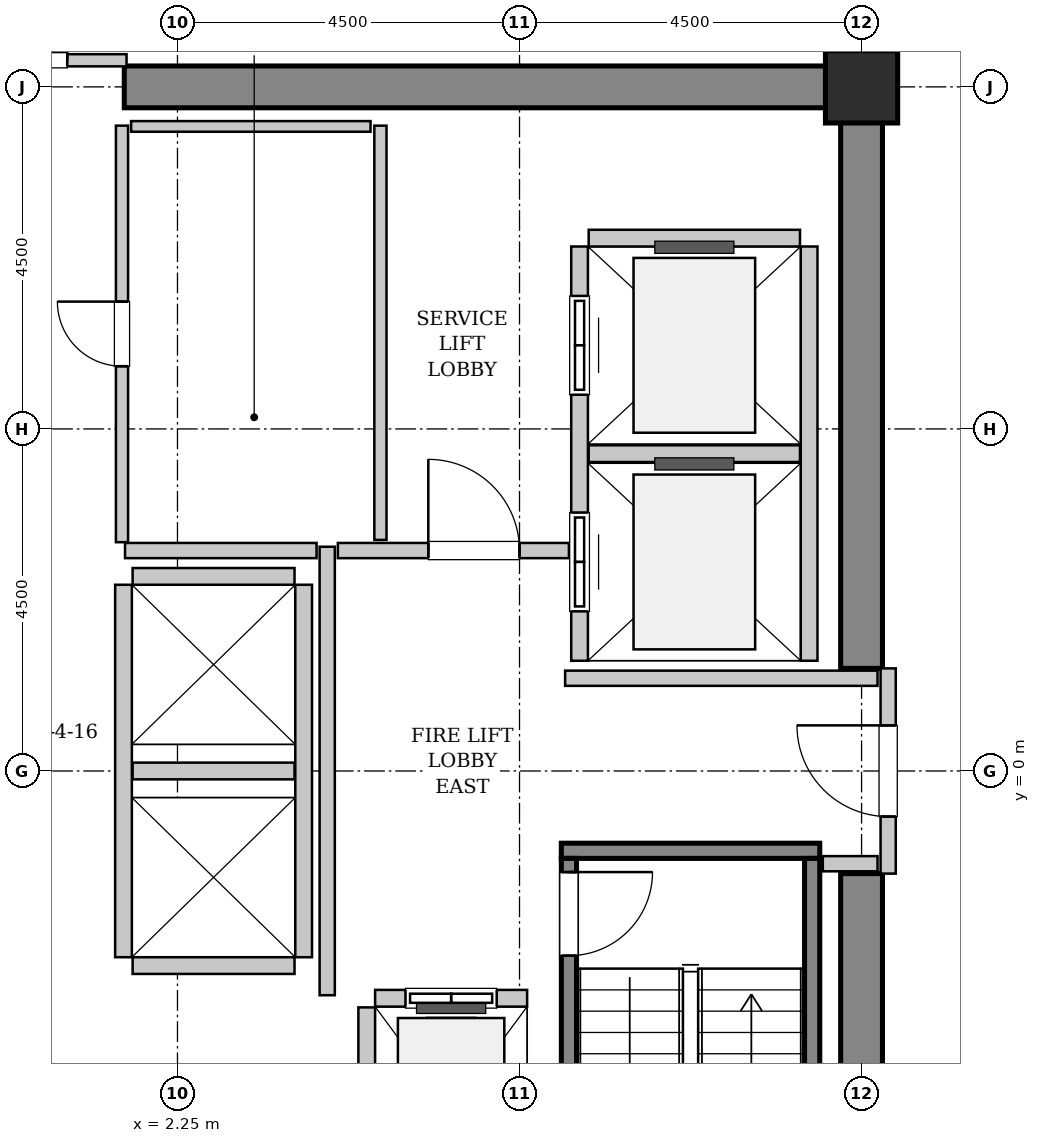
"""IFC4 building model, lengths in metres.
Left out: names, types, materials, properties, quantities, classifications, styles, units other than length and angle.
Written with IfcOpenShell. Run it as: python <this file> out.ifc"""

import sys

from ifc_helpers import new_model, si_unit, direction, frame, frame_2d, origin, origin_2d, place, context, subcontext, project, spatial, rectangle, hollow_rectangle, extrude, source, transform, mapped, element, fill, save


model = new_model("IFC4")
c1 = context("Model", 3, precision=1e-05, world=origin(), true_north=direction((0.0, 1.0)))
c2 = subcontext(c1, "Body", "Model", "MODEL_VIEW")
j1 = project(units=[si_unit("LENGTHUNIT", "METRE"), si_unit("PLANEANGLEUNIT", "RADIAN")], contexts=[c1])
p1 = place(None, origin())
s1 = spatial("IfcSite", under=j1, at=p1, CompositionType="ELEMENT")
p2 = place(p1, origin())
s2 = spatial("IfcBuilding", under=s1, at=p2, CompositionType="ELEMENT")
p3 = place(p2, frame((0.0, 0.0, 164.0)))
s3 = spatial("IfcBuildingStorey", under=s2, at=p3, CompositionType="ELEMENT", Elevation=164.0)
m1 = source(origin(), c2, "Body", "SweptSolid", [
    extrude(rectangle(XDim=9.975, YDim=0.55, at=frame_2d((4.987, 0.0))), origin(), (0.0, 0.0, 1.0), 3.8),
])
p4 = place(p3, frame((1.55, 9.0, 0.0), z_axis=(0.0, 0.0, 1.0), x_axis=(1.0, 0.0, 0.0)))
e1 = element("IfcWall", 1, at=p4, inside=s3, PredefinedType="SHEAR", context=c2, shape_type="MappedRepresentation", body=[
    mapped(m1, transform((0.0, 0.0, 0.0), x_axis=(1.0, 0.0, 0.0), y_axis=(0.0, 1.0, 0.0), z_axis=(0.0, 0.0, 1.0), scale=1.0)),
])
m2 = source(origin(), c2, "Body", "SweptSolid", [
    extrude(rectangle(XDim=7.375, YDim=0.55, at=frame_2d((3.688, 0.0))), origin(), (0.0, 0.0, 1.0), 3.8),
])
for number, where, z_axis, x_axis in (
    (2, (11.25, -8.725, 0.0), (0.0, 0.0, 1.0), (0.0, 1.0, 0.0)),
    (3, (11.25, 1.35, 0.0), (0.0, 0.0, 1.0), (0.0, 1.0, 0.0)),
):
    element("IfcWall", number, at=place(p3, frame(where, z_axis=z_axis, x_axis=x_axis)), inside=s3, PredefinedType="SHEAR", context=c2, shape_type="MappedRepresentation", body=[
        mapped(m2, transform((0.0, 0.0, 0.0), x_axis=(1.0, 0.0, 0.0), y_axis=(0.0, 1.0, 0.0), z_axis=(0.0, 0.0, 1.0), scale=1.0)),
    ])
m3 = source(origin(), c2, "Body", "SweptSolid", [
    extrude(hollow_rectangle(XDim=0.95, YDim=0.95, WallThickness=0.045, InnerFilletRadius=0.045, OuterFilletRadius=0.09, at=origin_2d()), origin(), (0.0, 0.0, 1.0), 3.8),
])
p5 = place(p3, frame((11.25, 9.0, 0.0), z_axis=(0.0, 0.0, 1.0), x_axis=(1.0, 0.0, 0.0)))
e4 = element("IfcColumn", 4, at=p5, inside=s3, PredefinedType="COLUMN", context=c2, shape_type="MappedRepresentation", body=[
    mapped(m3, transform((0.0, 0.0, 0.0), x_axis=(1.0, 0.0, 0.0), y_axis=(0.0, 1.0, 0.0), z_axis=(0.0, 0.0, 1.0), scale=1.0)),
])
m4 = source(origin(), c2, "Body", "SweptSolid", [
    extrude(rectangle(XDim=3.4, YDim=0.2, at=frame_2d((1.7, 0.0))), origin(), (0.0, 0.0, 1.0), 3.8),
])
p6 = place(p3, frame((7.3, -1.05, 0.0), z_axis=(0.0, 0.0, 1.0), x_axis=(1.0, 0.0, 0.0)))
e5 = element("IfcWall", 5, at=p6, inside=s3, PredefinedType="SOLIDWALL", context=c2, shape_type="MappedRepresentation", body=[
    mapped(m4, transform((0.0, 0.0, 0.0), x_axis=(1.0, 0.0, 0.0), y_axis=(0.0, 1.0, 0.0), z_axis=(0.0, 0.0, 1.0), scale=1.0)),
])
m5 = source(origin(), c2, "Body", "SweptSolid", [
    extrude(rectangle(XDim=7.1, YDim=0.2, at=frame_2d((3.55, 0.0))), origin(), (0.0, 0.0, 1.0), 3.8),
])
p7 = place(p3, frame((7.4, -1.15, 0.0), z_axis=(0.0, 0.0, 1.0), x_axis=(0.0, -1.0, 0.0)))
e6 = element("IfcWall", 6, at=p7, inside=s3, PredefinedType="SOLIDWALL", context=c2, shape_type="MappedRepresentation", body=[
    mapped(m5, transform((0.0, 0.0, 0.0), x_axis=(1.0, 0.0, 0.0), y_axis=(0.0, 1.0, 0.0), z_axis=(0.0, 0.0, 1.0), scale=1.0)),
])
p8 = place(p7, frame((0.18, 0.0, 0.0)))
e7 = element("IfcOpeningElement", 7, at=p8, cuts=e6, PredefinedType="OPENING", context=c2, shape_type="SweptSolid", body=[
    extrude(rectangle(XDim=1.1, YDim=2.15, at=frame_2d((0.55, 1.075))), frame((0.0, 0.11, 0.0), z_axis=(0.0, -1.0, 0.0), x_axis=(1.0, 0.0, 0.0)), (0.0, 0.0, 1.0), 0.22),
])
p9 = place(p3, frame((10.6, -1.15, 0.0), z_axis=(0.0, 0.0, 1.0), x_axis=(0.0, -1.0, 0.0)))
e8 = element("IfcWall", 8, at=p9, inside=s3, PredefinedType="SOLIDWALL", context=c2, shape_type="MappedRepresentation", body=[
    mapped(m5, transform((0.0, 0.0, 0.0), x_axis=(1.0, 0.0, 0.0), y_axis=(0.0, 1.0, 0.0), z_axis=(0.0, 0.0, 1.0), scale=1.0)),
])
m6 = source(origin(), c2, "Body", "SweptSolid", [
    extrude(rectangle(XDim=2.0, YDim=0.22, at=frame_2d((1.0, 0.0))), origin(), (0.0, 0.0, 1.0), 3.535),
])
p10 = place(p3, frame((6.85, -2.99, 0.0), z_axis=(0.0, 0.0, 1.0), x_axis=(-1.0, 0.0, 0.0)))
e9 = element("IfcWall", 9, at=p10, inside=s3, PredefinedType="SOLIDWALL", context=c2, shape_type="MappedRepresentation", body=[
    mapped(m6, transform((0.0, 0.0, 0.0), x_axis=(1.0, 0.0, 0.0), y_axis=(0.0, 1.0, 0.0), z_axis=(0.0, 0.0, 1.0), scale=1.0)),
])
p11 = place(p10, frame((0.4, 0.0, 0.0)))
e10 = element("IfcOpeningElement", 10, at=p11, cuts=e9, PredefinedType="OPENING", context=c2, shape_type="SweptSolid", body=[
    extrude(rectangle(XDim=1.2, YDim=2.2, at=frame_2d((0.6, 1.1))), frame((0.0, 0.12, 0.0), z_axis=(0.0, -1.0, 0.0), x_axis=(1.0, 0.0, 0.0)), (0.0, 0.0, 1.0), 0.24),
])
m7 = source(origin(), c2, "Body", "SweptSolid", [
    extrude(rectangle(XDim=2.68, YDim=0.22, at=frame_2d((1.34, 0.0))), origin(), (0.0, 0.0, 1.0), 3.535),
])
p12 = place(p3, frame((4.74, -3.11, 0.0), z_axis=(0.0, 0.0, 1.0), x_axis=(0.0, -1.0, 0.0)))
e11 = element("IfcWall", 11, at=p12, inside=s3, PredefinedType="SOLIDWALL", context=c2, shape_type="MappedRepresentation", body=[
    mapped(m7, transform((0.0, 0.0, 0.0), x_axis=(1.0, 0.0, 0.0), y_axis=(0.0, 1.0, 0.0), z_axis=(0.0, 0.0, 1.0), scale=1.0)),
])
m8 = source(origin(), c2, "Body", "SweptSolid", [
    extrude(rectangle(XDim=5.45, YDim=0.22, at=frame_2d((2.725, 0.0))), origin(), (0.0, 0.0, 1.0), 3.535),
])
p13 = place(p3, frame((7.54, 6.9, 0.0), z_axis=(0.0, 0.0, 1.0), x_axis=(0.0, -1.0, 0.0)))
e12 = element("IfcWall", 12, at=p13, inside=s3, PredefinedType="SOLIDWALL", context=c2, shape_type="MappedRepresentation", body=[
    mapped(m8, transform((0.0, 0.0, 0.0), x_axis=(1.0, 0.0, 0.0), y_axis=(0.0, 1.0, 0.0), z_axis=(0.0, 0.0, 1.0), scale=1.0)),
])
p14 = place(p13, frame((3.5, 0.0, 0.0)))
e13 = element("IfcOpeningElement", 13, at=p14, cuts=e12, PredefinedType="OPENING", context=c2, shape_type="SweptSolid", body=[
    extrude(rectangle(XDim=1.3, YDim=2.3, at=frame_2d((0.65, 1.15))), frame((0.0, 0.12, 0.0), z_axis=(0.0, -1.0, 0.0), x_axis=(1.0, 0.0, 0.0)), (0.0, 0.0, 1.0), 0.24),
])
p15 = place(p13, frame((0.65, 0.0, 0.0)))
e14 = element("IfcOpeningElement", 14, at=p15, cuts=e12, PredefinedType="OPENING", context=c2, shape_type="SweptSolid", body=[
    extrude(rectangle(XDim=1.3, YDim=2.3, at=frame_2d((0.65, 1.15))), frame((0.0, 0.12, 0.0), z_axis=(0.0, -1.0, 0.0), x_axis=(1.0, 0.0, 0.0)), (0.0, 0.0, 1.0), 0.24),
])
p16 = place(p3, frame((10.56, 1.45, 0.0), z_axis=(0.0, 0.0, 1.0), x_axis=(0.0, 1.0, 0.0)))
e15 = element("IfcWall", 15, at=p16, inside=s3, PredefinedType="SOLIDWALL", context=c2, shape_type="MappedRepresentation", body=[
    mapped(m8, transform((0.0, 0.0, 0.0), x_axis=(1.0, 0.0, 0.0), y_axis=(0.0, 1.0, 0.0), z_axis=(0.0, 0.0, 1.0), scale=1.0)),
])
m9 = source(origin(), c2, "Body", "SweptSolid", [
    extrude(rectangle(XDim=2.78, YDim=0.22, at=frame_2d((1.39, 0.0))), origin(), (0.0, 0.0, 1.0), 3.535),
])
for number, where, z_axis, x_axis in (
    (16, (7.66, 4.175, 0.0), (0.0, 0.0, 1.0), (1.0, 0.0, 0.0)),
    (17, (10.44, 7.01, 0.0), (0.0, 0.0, 1.0), (-1.0, 0.0, 0.0)),
):
    element("IfcWall", number, at=place(p3, frame(where, z_axis=z_axis, x_axis=x_axis)), inside=s3, PredefinedType="SOLIDWALL", context=c2, shape_type="MappedRepresentation", body=[
        mapped(m9, transform((0.0, 0.0, 0.0), x_axis=(1.0, 0.0, 0.0), y_axis=(0.0, 1.0, 0.0), z_axis=(0.0, 0.0, 1.0), scale=1.0)),
    ])
m10 = source(origin(), c2, "Body", "SweptSolid", [
    extrude(rectangle(XDim=4.9, YDim=0.22, at=frame_2d((2.45, 0.0))), origin(), (0.0, 0.0, 1.0), 3.535),
])
for number, where, z_axis, x_axis in (
    (18, (1.54, 2.45, 0.0), (0.0, 0.0, 1.0), (0.0, -1.0, 0.0)),
    (19, (3.91, -2.45, 0.0), (0.0, 0.0, 1.0), (0.0, 1.0, 0.0)),
):
    element("IfcWall", number, at=place(p3, frame(where, z_axis=z_axis, x_axis=x_axis)), inside=s3, PredefinedType="SOLIDWALL", context=c2, shape_type="MappedRepresentation", body=[
        mapped(m10, transform((0.0, 0.0, 0.0), x_axis=(1.0, 0.0, 0.0), y_axis=(0.0, 1.0, 0.0), z_axis=(0.0, 0.0, 1.0), scale=1.0)),
    ])
m11 = source(origin(), c2, "Body", "SweptSolid", [
    extrude(rectangle(XDim=2.13, YDim=0.22, at=frame_2d((1.065, 0.0))), origin(), (0.0, 0.0, 1.0), 3.535),
])
for number, where, z_axis, x_axis in (
    (20, (1.66, -2.56, 0.0), (0.0, 0.0, 1.0), (1.0, 0.0, 0.0)),
    (21, (1.66, 0.0, 0.0), (0.0, 0.0, 1.0), (1.0, 0.0, 0.0)),
    (22, (3.79, 2.56, 0.0), (0.0, 0.0, 1.0), (-1.0, 0.0, 0.0)),
):
    element("IfcWall", number, at=place(p3, frame(where, z_axis=z_axis, x_axis=x_axis)), inside=s3, PredefinedType="SOLIDWALL", context=c2, shape_type="MappedRepresentation", body=[
        mapped(m11, transform((0.0, 0.0, 0.0), x_axis=(1.0, 0.0, 0.0), y_axis=(0.0, 1.0, 0.0), z_axis=(0.0, 0.0, 1.0), scale=1.0)),
    ])
m12 = source(origin(), c2, "Body", "SweptSolid", [
    extrude(rectangle(XDim=2.7, YDim=0.2, at=frame_2d((1.35, 0.0))), origin(), (0.0, 0.0, 1.0), 2.425),
])
p17 = place(p3, frame((11.6, -1.35, 0.0), z_axis=(0.0, 0.0, 1.0), x_axis=(0.0, 1.0, 0.0)))
e23 = element("IfcWall", 23, at=p17, inside=s3, PredefinedType="PARTITIONING", context=c2, shape_type="MappedRepresentation", body=[
    mapped(m12, transform((0.0, 0.0, 0.0), x_axis=(1.0, 0.0, 0.0), y_axis=(0.0, 1.0, 0.0), z_axis=(0.0, 0.0, 1.0), scale=1.0)),
])
p18 = place(p17, frame((0.75, 0.0, 0.0)))
e24 = element("IfcOpeningElement", 24, at=p18, cuts=e23, PredefinedType="OPENING", context=c2, shape_type="SweptSolid", body=[
    extrude(rectangle(XDim=1.2, YDim=2.15, at=frame_2d((0.6, 1.075))), frame((0.0, 0.11, 0.0), z_axis=(0.0, -1.0, 0.0), x_axis=(1.0, 0.0, 0.0)), (0.0, 0.0, 1.0), 0.22),
])
m13 = source(origin(), c2, "Body", "SweptSolid", [
    extrude(rectangle(XDim=5.9, YDim=0.2, at=frame_2d((2.95, 0.0))), origin(), (0.0, 0.0, 1.0), 3.535),
])
p19 = place(p3, frame((4.22, -2.95, 0.0), z_axis=(0.0, 0.0, 1.0), x_axis=(0.0, 1.0, 0.0)))
e25 = element("IfcWall", 25, at=p19, inside=s3, PredefinedType="PARTITIONING", context=c2, shape_type="MappedRepresentation", body=[
    mapped(m13, transform((0.0, 0.0, 0.0), x_axis=(1.0, 0.0, 0.0), y_axis=(0.0, 1.0, 0.0), z_axis=(0.0, 0.0, 1.0), scale=1.0)),
])
m14 = source(origin(), c2, "Body", "SweptSolid", [
    extrude(rectangle(XDim=2.52, YDim=0.2, at=frame_2d((1.26, 0.0))), origin(), (0.0, 0.0, 1.0), 3.535),
])
p20 = place(p3, frame((1.56, 2.9, 0.0), z_axis=(0.0, 0.0, 1.0), x_axis=(1.0, 0.0, 0.0)))
e26 = element("IfcWall", 26, at=p20, inside=s3, PredefinedType="PARTITIONING", context=c2, shape_type="MappedRepresentation", body=[
    mapped(m14, transform((0.0, 0.0, 0.0), x_axis=(1.0, 0.0, 0.0), y_axis=(0.0, 1.0, 0.0), z_axis=(0.0, 0.0, 1.0), scale=1.0)),
])
m15 = source(origin(), c2, "Body", "SweptSolid", [
    extrude(rectangle(XDim=3.04, YDim=0.2, at=frame_2d((1.52, 0.0))), origin(), (0.0, 0.0, 1.0), 3.535),
])
p21 = place(p3, frame((4.36, 2.9, 0.0), z_axis=(0.0, 0.0, 1.0), x_axis=(1.0, 0.0, 0.0)))
e27 = element("IfcWall", 27, at=p21, inside=s3, PredefinedType="PARTITIONING", context=c2, shape_type="MappedRepresentation", body=[
    mapped(m15, transform((0.0, 0.0, 0.0), x_axis=(1.0, 0.0, 0.0), y_axis=(0.0, 1.0, 0.0), z_axis=(0.0, 0.0, 1.0), scale=1.0)),
])
p22 = place(p21, frame((1.19, 0.0, 0.0)))
e28 = element("IfcOpeningElement", 28, at=p22, cuts=e27, PredefinedType="OPENING", context=c2, shape_type="SweptSolid", body=[
    extrude(rectangle(XDim=1.2, YDim=2.15, at=frame_2d((0.6, 1.075))), frame((0.0, 0.11, 0.0), z_axis=(0.0, -1.0, 0.0), x_axis=(1.0, 0.0, 0.0)), (0.0, 0.0, 1.0), 0.22),
])
m16 = source(origin(), c2, "Body", "SweptSolid", [
    extrude(rectangle(XDim=4.11, YDim=0.2, at=frame_2d((2.055, 0.0))), origin(), (0.0, 0.0, 1.0), 3.535),
])
p23 = place(p3, frame((7.35, 1.22, 0.0), z_axis=(0.0, 0.0, 1.0), x_axis=(1.0, 0.0, 0.0)))
e29 = element("IfcWall", 29, at=p23, inside=s3, PredefinedType="PARTITIONING", context=c2, shape_type="MappedRepresentation", body=[
    mapped(m16, transform((0.0, 0.0, 0.0), x_axis=(1.0, 0.0, 0.0), y_axis=(0.0, 1.0, 0.0), z_axis=(0.0, 0.0, 1.0), scale=1.0)),
])
m17 = source(origin(), c2, "Body", "SweptSolid", [
    extrude(rectangle(XDim=0.72, YDim=0.2, at=frame_2d((0.36, 0.0))), origin(), (0.0, 0.0, 1.0), 3.535),
])
p24 = place(p3, frame((10.74, -1.22, 0.0), z_axis=(0.0, 0.0, 1.0), x_axis=(1.0, 0.0, 0.0)))
e30 = element("IfcWall", 30, at=p24, inside=s3, PredefinedType="PARTITIONING", context=c2, shape_type="MappedRepresentation", body=[
    mapped(m17, transform((0.0, 0.0, 0.0), x_axis=(1.0, 0.0, 0.0), y_axis=(0.0, 1.0, 0.0), z_axis=(0.0, 0.0, 1.0), scale=1.0)),
])
m18 = source(origin(), c2, "Body", "SweptSolid", [
    extrude(rectangle(XDim=3.16, YDim=0.16, at=frame_2d((1.58, 0.0))), origin(), (0.0, 0.0, 1.0), 2.425),
])
p25 = place(p3, frame((-1.58, 9.35, 0.0), z_axis=(0.0, 0.0, 1.0), x_axis=(1.0, 0.0, 0.0)))
e31 = element("IfcWall", 31, at=p25, inside=s3, PredefinedType="PARTITIONING", context=c2, shape_type="MappedRepresentation", body=[
    mapped(m18, transform((0.0, 0.0, 0.0), x_axis=(1.0, 0.0, 0.0), y_axis=(0.0, 1.0, 0.0), z_axis=(0.0, 0.0, 1.0), scale=1.0)),
])
p26 = place(p25, frame((0.78, 0.0, 0.0)))
e32 = element("IfcOpeningElement", 32, at=p26, cuts=e31, PredefinedType="OPENING", context=c2, shape_type="SweptSolid", body=[
    extrude(rectangle(XDim=1.6, YDim=2.3, at=frame_2d((0.8, 1.15))), frame((0.0, 0.09, 0.0), z_axis=(0.0, -1.0, 0.0), x_axis=(1.0, 0.0, 0.0)), (0.0, 0.0, 1.0), 0.18),
])
m19 = source(origin(), c2, "Body", "SweptSolid", [
    extrude(rectangle(XDim=5.45, YDim=0.16, at=frame_2d((2.725, 0.0))), origin(), (0.0, 0.0, 1.0), 3.535),
])
p27 = place(p3, frame((4.92, 3.04, 0.0), z_axis=(0.0, 0.0, 1.0), x_axis=(0.0, 1.0, 0.0)))
e33 = element("IfcWall", 33, at=p27, inside=s3, PredefinedType="PARTITIONING", context=c2, shape_type="MappedRepresentation", body=[
    mapped(m19, transform((0.0, 0.0, 0.0), x_axis=(1.0, 0.0, 0.0), y_axis=(0.0, 1.0, 0.0), z_axis=(0.0, 0.0, 1.0), scale=1.0)),
])
m20 = source(origin(), c2, "Body", "SweptSolid", [
    extrude(rectangle(XDim=5.48, YDim=0.16, at=frame_2d((2.74, 0.0))), origin(), (0.0, 0.0, 1.0), 3.535),
])
p28 = place(p3, frame((1.52, 3.01, 0.0), z_axis=(0.0, 0.0, 1.0), x_axis=(0.0, 1.0, 0.0)))
e34 = element("IfcWall", 34, at=p28, inside=s3, PredefinedType="PARTITIONING", context=c2, shape_type="MappedRepresentation", body=[
    mapped(m20, transform((0.0, 0.0, 0.0), x_axis=(1.0, 0.0, 0.0), y_axis=(0.0, 1.0, 0.0), z_axis=(0.0, 0.0, 1.0), scale=1.0)),
])
p29 = place(p28, frame((2.315, 0.0, 0.0)))
e35 = element("IfcOpeningElement", 35, at=p29, cuts=e34, PredefinedType="OPENING", context=c2, shape_type="SweptSolid", body=[
    extrude(rectangle(XDim=0.85, YDim=2.1, at=frame_2d((0.425, 1.05))), frame((0.0, 0.09, 0.0), z_axis=(0.0, -1.0, 0.0), x_axis=(1.0, 0.0, 0.0)), (0.0, 0.0, 1.0), 0.18),
])
m21 = source(origin(), c2, "Body", "SweptSolid", [
    extrude(rectangle(XDim=3.15, YDim=0.14, at=frame_2d((1.575, 0.0))), origin(), (0.0, 0.0, 1.0), 3.535),
])
p30 = place(p3, frame((1.64, 8.48, 0.0), z_axis=(0.0, 0.0, 1.0), x_axis=(1.0, 0.0, 0.0)))
e36 = element("IfcWall", 36, at=p30, inside=s3, PredefinedType="PARTITIONING", context=c2, shape_type="MappedRepresentation", body=[
    mapped(m21, transform((0.0, 0.0, 0.0), x_axis=(1.0, 0.0, 0.0), y_axis=(0.0, 1.0, 0.0), z_axis=(0.0, 0.0, 1.0), scale=1.0)),
])
m22 = source(origin(), c2, "Body", "SweptSolid", [
    extrude(rectangle(XDim=1.1, YDim=2.15, at=frame_2d((0.55, 1.075))), frame((0.0, 0.025, 0.0), z_axis=(0.0, -1.0, 0.0), x_axis=(1.0, 0.0, 0.0)), (0.0, 0.0, 1.0), 0.05),
])
p31 = place(p8, origin())
e37 = element("IfcDoor", 37, at=p31, inside=s3, OperationType="SINGLE_SWING_LEFT", PredefinedType="DOOR", context=c2, shape_type="MappedRepresentation", body=[
    mapped(m22, transform((0.0, 0.0, 0.0), x_axis=(1.0, 0.0, 0.0), y_axis=(0.0, 1.0, 0.0), z_axis=(0.0, 0.0, 1.0), scale=1.0)),
])
fill(e7, e37)
m23 = source(origin(), c2, "Body", "SweptSolid", [
    extrude(rectangle(XDim=1.2, YDim=2.2, at=frame_2d((0.6, 1.1))), frame((0.0, 0.025, 0.0), z_axis=(0.0, -1.0, 0.0), x_axis=(1.0, 0.0, 0.0)), (0.0, 0.0, 1.0), 0.05),
])
p32 = place(p11, origin())
e38 = element("IfcDoor", 38, at=p32, inside=s3, OperationType="SLIDING_TO_LEFT", PredefinedType="DOOR", context=c2, shape_type="MappedRepresentation", body=[
    mapped(m23, transform((0.0, 0.0, 0.0), x_axis=(1.0, 0.0, 0.0), y_axis=(0.0, 1.0, 0.0), z_axis=(0.0, 0.0, 1.0), scale=1.0)),
])
fill(e10, e38)
m24 = source(origin(), c2, "Body", "SweptSolid", [
    extrude(rectangle(XDim=1.3, YDim=2.3, at=frame_2d((0.65, 1.15))), frame((0.0, 0.025, 0.0), z_axis=(0.0, -1.0, 0.0), x_axis=(1.0, 0.0, 0.0)), (0.0, 0.0, 1.0), 0.05),
])
p33 = place(p14, origin())
e39 = element("IfcDoor", 39, at=p33, inside=s3, OperationType="SLIDING_TO_RIGHT", PredefinedType="DOOR", context=c2, shape_type="MappedRepresentation", body=[
    mapped(m24, transform((0.0, 0.0, 0.0), x_axis=(1.0, 0.0, 0.0), y_axis=(0.0, 1.0, 0.0), z_axis=(0.0, 0.0, 1.0), scale=1.0)),
])
fill(e13, e39)
p34 = place(p15, origin())
e40 = element("IfcDoor", 40, at=p34, inside=s3, OperationType="SLIDING_TO_RIGHT", PredefinedType="DOOR", context=c2, shape_type="MappedRepresentation", body=[
    mapped(m24, transform((0.0, 0.0, 0.0), x_axis=(1.0, 0.0, 0.0), y_axis=(0.0, 1.0, 0.0), z_axis=(0.0, 0.0, 1.0), scale=1.0)),
])
fill(e14, e40)
m25 = source(origin(), c2, "Body", "SweptSolid", [
    extrude(rectangle(XDim=1.2, YDim=2.15, at=frame_2d((0.6, 1.075))), frame((0.0, 0.025, 0.0), z_axis=(0.0, -1.0, 0.0), x_axis=(1.0, 0.0, 0.0)), (0.0, 0.0, 1.0), 0.05),
])
p35 = place(p18, origin())
e41 = element("IfcDoor", 41, at=p35, inside=s3, OperationType="SINGLE_SWING_RIGHT", PredefinedType="DOOR", context=c2, shape_type="MappedRepresentation", body=[
    mapped(m25, transform((0.0, 0.0, 0.0), x_axis=(1.0, 0.0, 0.0), y_axis=(0.0, 1.0, 0.0), z_axis=(0.0, 0.0, 1.0), scale=1.0)),
])
fill(e24, e41)
p36 = place(p22, origin())
e42 = element("IfcDoor", 42, at=p36, inside=s3, OperationType="SINGLE_SWING_LEFT", PredefinedType="DOOR", context=c2, shape_type="MappedRepresentation", body=[
    mapped(m25, transform((0.0, 0.0, 0.0), x_axis=(1.0, 0.0, 0.0), y_axis=(0.0, 1.0, 0.0), z_axis=(0.0, 0.0, 1.0), scale=1.0)),
])
fill(e28, e42)
m26 = source(origin(), c2, "Body", "SweptSolid", [
    extrude(rectangle(XDim=1.6, YDim=2.3, at=frame_2d((0.8, 1.15))), frame((0.0, 0.025, 0.0), z_axis=(0.0, -1.0, 0.0), x_axis=(1.0, 0.0, 0.0)), (0.0, 0.0, 1.0), 0.05),
])
p37 = place(p26, origin())
e43 = element("IfcDoor", 43, at=p37, inside=s3, OperationType="DOUBLE_DOOR_SINGLE_SWING", PredefinedType="DOOR", context=c2, shape_type="MappedRepresentation", body=[
    mapped(m26, transform((0.0, 0.0, 0.0), x_axis=(1.0, 0.0, 0.0), y_axis=(0.0, 1.0, 0.0), z_axis=(0.0, 0.0, 1.0), scale=1.0)),
])
fill(e32, e43)
m27 = source(origin(), c2, "Body", "SweptSolid", [
    extrude(rectangle(XDim=0.85, YDim=2.1, at=frame_2d((0.425, 1.05))), frame((0.0, 0.025, 0.0), z_axis=(0.0, -1.0, 0.0), x_axis=(1.0, 0.0, 0.0)), (0.0, 0.0, 1.0), 0.05),
])
p38 = place(p29, origin())
e44 = element("IfcDoor", 44, at=p38, inside=s3, OperationType="SINGLE_SWING_RIGHT", PredefinedType="DOOR", context=c2, shape_type="MappedRepresentation", body=[
    mapped(m27, transform((0.0, 0.0, 0.0), x_axis=(1.0, 0.0, 0.0), y_axis=(0.0, 1.0, 0.0), z_axis=(0.0, 0.0, 1.0), scale=1.0)),
])
fill(e35, e44)
save(model, sys.argv[1])
